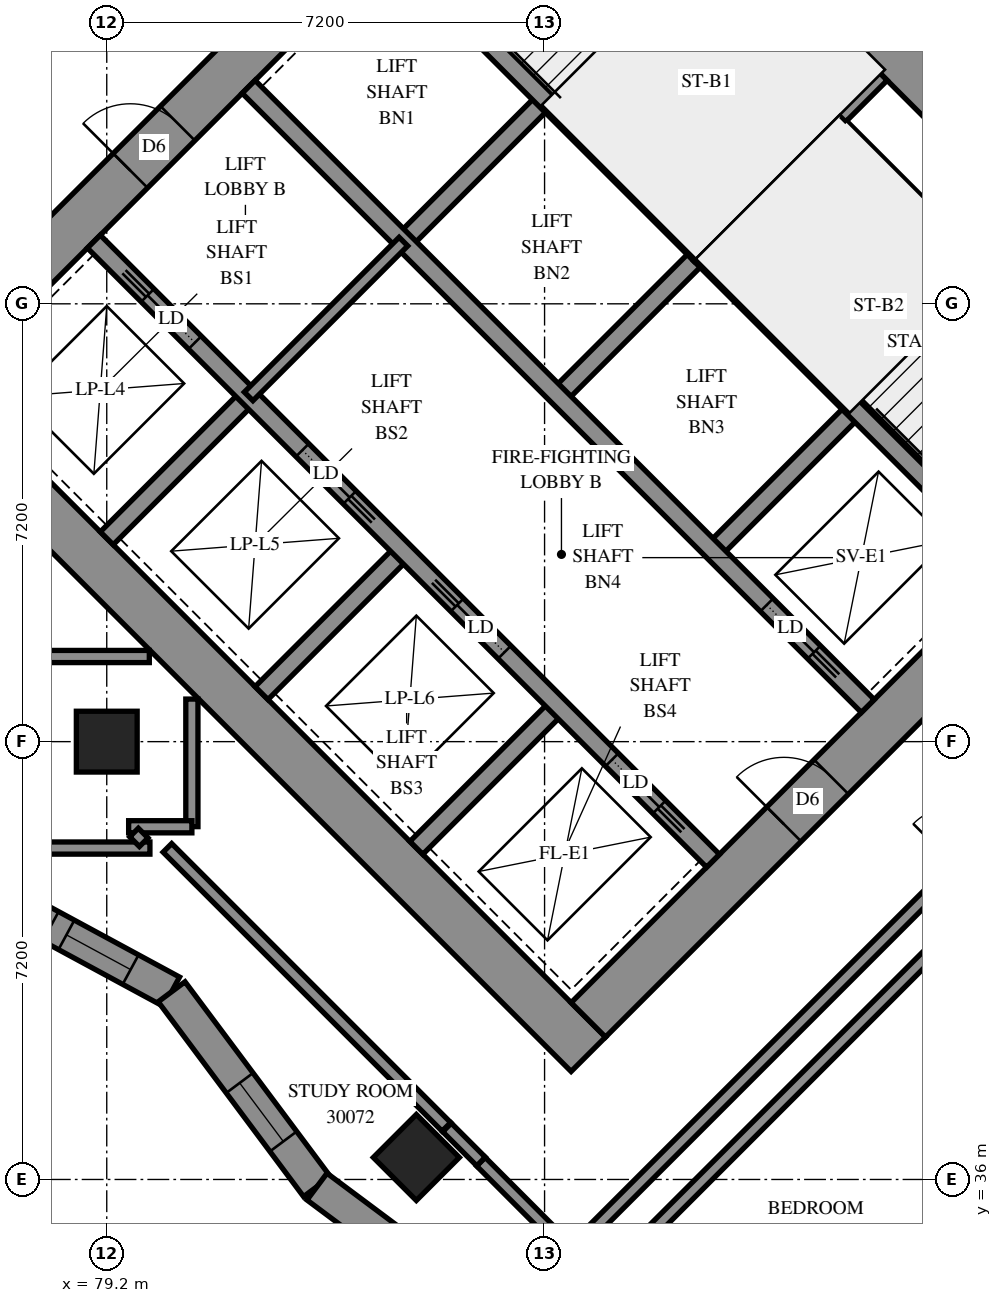
"""IFC4 building model, lengths in metres.
Left out: names, types, materials, properties, quantities, classifications, styles, units other than length and angle.
Written with IfcOpenShell. Run it as: python <this file> out.ifc"""

import sys

from ifc_helpers import new_model, si_unit, direction, frame, frame_2d, origin, origin_2d, place, context, subcontext, project, spatial, polyline, rectangle, outline, extrude, element, fill, save


model = new_model("IFC4")
c1 = context("Model", 3, precision=1e-05, world=origin(), true_north=direction((0.0, 1.0)))
c2 = subcontext(c1, "Body", "Model", "MODEL_VIEW")
j1 = project(units=[si_unit("LENGTHUNIT", "METRE"), si_unit("PLANEANGLEUNIT", "RADIAN")], contexts=[c1])
p1 = place(None, origin())
s1 = spatial("IfcSite", under=j1, at=p1, CompositionType="ELEMENT")
p2 = place(p1, origin())
s2 = spatial("IfcBuilding", under=s1, at=p2, CompositionType="ELEMENT")
p3 = place(p2, frame((0.0, 0.0, 111.8)))
s3 = spatial("IfcBuildingStorey", under=s2, at=p3, CompositionType="ELEMENT", Elevation=111.8)
for number, where, z_axis, x_axis in (
    (1, (79.2, 43.2, 0.0), (0.0, 0.0, 1.0), (1.0, 0.0, 0.0)),
    (2, (84.291, 36.362, 0.0), (0.0, 0.0, 1.0), (0.707, -0.707, 0.0)),
):
    element("IfcColumn", number, at=place(p3, frame(where, z_axis=z_axis, x_axis=x_axis)), inside=s3, PredefinedType="COLUMN", context=c2, shape_type="SweptSolid", body=[
        extrude(rectangle(XDim=1.0, YDim=1.0, at=origin_2d()), origin(), (0.0, 0.0, 1.0), 3.1),
    ])
p4 = place(p3, frame((75.806, 49.373, -0.3), z_axis=(0.0, 0.0, 1.0), x_axis=(0.7071067812, -0.7071067812, 0.0)))
e3 = element("IfcWall", 3, at=p4, inside=s3, PredefinedType="SHEAR", context=c2, shape_type="SweptSolid", body=[
    extrude(rectangle(XDim=16.0, YDim=0.8, at=frame_2d((8.0, 0.0))), origin(), (0.0, 0.0, 1.0), 2.7),
])
p5 = place(p3, frame((86.554, 60.121, -0.3), z_axis=(0.0, 0.0, 1.0), x_axis=(0.7071067812, -0.7071067812, 0.0)))
e4 = element("IfcWall", 4, at=p5, inside=s3, PredefinedType="SHEAR", context=c2, shape_type="SweptSolid", body=[
    extrude(rectangle(XDim=16.0, YDim=0.8, at=frame_2d((8.0, 0.0))), origin(), (0.0, 0.0, 1.0), 2.7),
])
p6 = place(p5, frame((10.8, 0.0, 0.3)))
e5 = element("IfcOpeningElement", 5, at=p6, cuts=e4, PredefinedType="OPENING", context=c2, shape_type="SweptSolid", body=[
    extrude(rectangle(XDim=0.8, YDim=2.1, at=frame_2d((0.4, 1.05))), frame((0.0, 0.41, 0.0), z_axis=(0.0, -1.0, 0.0), x_axis=(1.0, 0.0, 0.0)), (0.0, 0.0, 1.0), 0.82),
])
p7 = place(p3, frame((76.372, 49.373, -0.3), z_axis=(0.0, 0.0, 1.0), x_axis=(0.7071067812, 0.7071067812, 0.0)))
e6 = element("IfcWall", 6, at=p7, inside=s3, PredefinedType="SHEAR", context=c2, shape_type="SweptSolid", body=[
    extrude(rectangle(XDim=14.4, YDim=0.8, at=frame_2d((7.2, 0.0))), origin(), (0.0, 0.0, 1.0), 2.7),
])
p8 = place(p7, frame((4.55, 0.0, 0.3)))
e7 = element("IfcOpeningElement", 7, at=p8, cuts=e6, PredefinedType="OPENING", context=c2, shape_type="SweptSolid", body=[
    extrude(rectangle(XDim=1.1, YDim=2.1, at=frame_2d((0.55, 1.05))), frame((0.0, 0.41, 0.0), z_axis=(0.0, -1.0, 0.0), x_axis=(1.0, 0.0, 0.0)), (0.0, 0.0, 1.0), 0.82),
])
p9 = place(p7, frame((11.35, 0.0, 0.3)))
e8 = element("IfcOpeningElement", 8, at=p9, cuts=e6, PredefinedType="OPENING", context=c2, shape_type="SweptSolid", body=[
    extrude(rectangle(XDim=1.1, YDim=2.1, at=frame_2d((0.55, 1.05))), frame((0.0, 0.41, 0.0), z_axis=(0.0, -1.0, 0.0), x_axis=(1.0, 0.0, 0.0)), (0.0, 0.0, 1.0), 0.82),
])
p10 = place(p3, frame((87.12, 38.625, -0.3), z_axis=(0.0, 0.0, 1.0), x_axis=(0.7071067812, 0.7071067812, 0.0)))
e9 = element("IfcWall", 9, at=p10, inside=s3, PredefinedType="SHEAR", context=c2, shape_type="SweptSolid", body=[
    extrude(rectangle(XDim=14.4, YDim=0.8, at=frame_2d((7.2, 0.0))), origin(), (0.0, 0.0, 1.0), 2.7),
])
p11 = place(p10, frame((4.55, 0.0, 0.3)))
e10 = element("IfcOpeningElement", 10, at=p11, cuts=e9, PredefinedType="OPENING", context=c2, shape_type="SweptSolid", body=[
    extrude(rectangle(XDim=1.1, YDim=2.1, at=frame_2d((0.55, 1.05))), frame((0.0, 0.41, 0.0), z_axis=(0.0, -1.0, 0.0), x_axis=(1.0, 0.0, 0.0)), (0.0, 0.0, 1.0), 0.82),
])
p12 = place(p10, frame((11.35, 0.0, 0.3)))
e11 = element("IfcOpeningElement", 11, at=p12, cuts=e9, PredefinedType="OPENING", context=c2, shape_type="SweptSolid", body=[
    extrude(rectangle(XDim=1.1, YDim=2.1, at=frame_2d((0.55, 1.05))), frame((0.0, 0.41, 0.0), z_axis=(0.0, -1.0, 0.0), x_axis=(1.0, 0.0, 0.0)), (0.0, 0.0, 1.0), 0.82),
])
for number, where, z_axis, x_axis in (
    (12, (79.2, 46.544, 0.0), (0.0, 0.0, 1.0), (0.707, 0.707, 0.0)),
    (13, (84.079, 51.423, 0.0), (0.0, 0.0, 1.0), (0.707, 0.707, 0.0)),
):
    element("IfcWall", number, at=place(p3, frame(where, z_axis=z_axis, x_axis=x_axis)), inside=s3, PredefinedType="SOLIDWALL", context=c2, shape_type="SweptSolid", body=[
        extrude(rectangle(XDim=3.3, YDim=0.3, at=frame_2d((1.65, 0.0))), origin(), (0.0, 0.0, 1.0), 3.1),
    ])
p13 = place(p3, frame((81.746, 43.999, 0.0), z_axis=(0.0, 0.0, 1.0), x_axis=(0.7071067812, 0.7071067812, 0.0)))
e14 = element("IfcWall", 14, at=p13, inside=s3, PredefinedType="SOLIDWALL", context=c2, shape_type="SweptSolid", body=[
    extrude(rectangle(XDim=3.3, YDim=0.3, at=frame_2d((1.65, 0.0))), origin(), (0.0, 0.0, 1.0), 3.1),
])
p14 = place(p3, frame((86.625, 48.878, 0.0), z_axis=(0.0, 0.0, 1.0), x_axis=(0.7071067812, 0.7071067812, 0.0)))
e15 = element("IfcWall", 15, at=p14, inside=s3, PredefinedType="SOLIDWALL", context=c2, shape_type="SweptSolid", body=[
    extrude(rectangle(XDim=3.3, YDim=0.3, at=frame_2d((1.65, 0.0))), origin(), (0.0, 0.0, 1.0), 3.1),
])
p15 = place(p3, frame((84.291, 41.453, 0.0), z_axis=(0.0, 0.0, 1.0), x_axis=(0.7071067812, 0.7071067812, 0.0)))
e16 = element("IfcWall", 16, at=p15, inside=s3, PredefinedType="SOLIDWALL", context=c2, shape_type="SweptSolid", body=[
    extrude(rectangle(XDim=3.3, YDim=0.3, at=frame_2d((1.65, 0.0))), origin(), (0.0, 0.0, 1.0), 3.1),
])
p16 = place(p3, frame((89.17, 46.332, 0.0), z_axis=(0.0, 0.0, 1.0), x_axis=(0.7071067812, 0.7071067812, 0.0)))
e17 = element("IfcWall", 17, at=p16, inside=s3, PredefinedType="SOLIDWALL", context=c2, shape_type="SweptSolid", body=[
    extrude(rectangle(XDim=3.3, YDim=0.3, at=frame_2d((1.65, 0.0))), origin(), (0.0, 0.0, 1.0), 3.1),
])
p17 = place(p3, frame((78.988, 51.423, 0.0), z_axis=(0.0, 0.0, 1.0), x_axis=(0.7071067812, -0.7071067812, 0.0)))
e18 = element("IfcWall", 18, at=p17, inside=s3, PredefinedType="SOLIDWALL", context=c2, shape_type="SweptSolid", body=[
    extrude(rectangle(XDim=14.4, YDim=0.3, at=frame_2d((7.2, 0.0))), origin(), (0.0, 0.0, 1.0), 3.1),
])
p18 = place(p17, frame((1.25, 0.0, 0.0)))
e19 = element("IfcOpeningElement", 19, at=p18, cuts=e18, PredefinedType="OPENING", context=c2, shape_type="SweptSolid", body=[
    extrude(rectangle(XDim=1.1, YDim=2.1, at=frame_2d((0.55, 1.05))), frame((0.0, 0.16, 0.0), z_axis=(0.0, -1.0, 0.0), x_axis=(1.0, 0.0, 0.0)), (0.0, 0.0, 1.0), 0.32),
])
p19 = place(p17, frame((4.85, 0.0, 0.0)))
e20 = element("IfcOpeningElement", 20, at=p19, cuts=e18, PredefinedType="OPENING", context=c2, shape_type="SweptSolid", body=[
    extrude(rectangle(XDim=1.1, YDim=2.1, at=frame_2d((0.55, 1.05))), frame((0.0, 0.16, 0.0), z_axis=(0.0, -1.0, 0.0), x_axis=(1.0, 0.0, 0.0)), (0.0, 0.0, 1.0), 0.32),
])
p20 = place(p17, frame((8.45, 0.0, 0.0)))
e21 = element("IfcOpeningElement", 21, at=p20, cuts=e18, PredefinedType="OPENING", context=c2, shape_type="SweptSolid", body=[
    extrude(rectangle(XDim=1.1, YDim=2.1, at=frame_2d((0.55, 1.05))), frame((0.0, 0.16, 0.0), z_axis=(0.0, -1.0, 0.0), x_axis=(1.0, 0.0, 0.0)), (0.0, 0.0, 1.0), 0.32),
])
p21 = place(p17, frame((12.05, 0.0, 0.0)))
e22 = element("IfcOpeningElement", 22, at=p21, cuts=e18, PredefinedType="OPENING", context=c2, shape_type="SweptSolid", body=[
    extrude(rectangle(XDim=1.1, YDim=2.1, at=frame_2d((0.55, 1.05))), frame((0.0, 0.16, 0.0), z_axis=(0.0, -1.0, 0.0), x_axis=(1.0, 0.0, 0.0)), (0.0, 0.0, 1.0), 0.32),
])
p22 = place(p3, frame((81.534, 53.969, 0.0), z_axis=(0.0, 0.0, 1.0), x_axis=(0.707103309, -0.7071102534, 0.0)))
e23 = element("IfcWall", 23, at=p22, inside=s3, PredefinedType="SOLIDWALL", context=c2, shape_type="SweptSolid", body=[
    extrude(rectangle(XDim=14.4, YDim=0.3, at=frame_2d((7.2, 0.0))), origin(), (0.0, 0.0, 1.0), 3.1),
])
p23 = place(p22, frame((12.05, 0.0, 0.0)))
e24 = element("IfcOpeningElement", 24, at=p23, cuts=e23, PredefinedType="OPENING", context=c2, shape_type="SweptSolid", body=[
    extrude(rectangle(XDim=1.1, YDim=2.1, at=frame_2d((0.55, 1.05))), frame((0.0, 0.16, 0.0), z_axis=(0.0, -1.0, 0.0), x_axis=(1.0, 0.0, 0.0)), (0.0, 0.0, 1.0), 0.32),
])
for number, where, z_axis, x_axis in (
    (25, (83.867, 56.302, 0.0), (0.0, 0.0, 1.0), (0.707, -0.707, 0.0)),
    (26, (88.958, 51.211, 0.0), (0.0, 0.0, 1.0), (0.707, -0.707, 0.0)),
):
    element("IfcWall", number, at=place(p3, frame(where, z_axis=z_axis, x_axis=x_axis)), inside=s3, PredefinedType="SOLIDWALL", context=c2, shape_type="SweptSolid", body=[
        extrude(rectangle(XDim=7.2, YDim=0.3, at=frame_2d((3.6, 0.0))), origin(), (0.0, 0.0, 1.0), 3.1),
    ])
p24 = place(p3, frame((88.958, 51.211, 0.0), z_axis=(0.0, 0.0, 1.0), x_axis=(0.7071067812, 0.7071067812, 0.0)))
e27 = element("IfcWall", 27, at=p24, inside=s3, PredefinedType="SOLIDWALL", context=c2, shape_type="SweptSolid", body=[
    extrude(rectangle(XDim=4.2, YDim=0.3, at=frame_2d((2.1, 0.0))), origin(), (0.0, 0.0, 1.0), 3.1),
])
p25 = place(p3, frame((76.581, 41.081, 0.0), z_axis=(0.0, 0.0, 1.0), x_axis=(0.8794967773, -0.475904842, 0.0)))
e28 = element("IfcWall", 28, at=p25, inside=s3, PredefinedType="SOLIDWALL", context=c2, shape_type="SweptSolid", body=[
    extrude(outline(polyline([(0.023, -0.275), (4.13, -0.275), (4.251, 0.275), (-0.023, 0.275), (0.023, -0.275)])), origin(), (0.0, 0.0, 1.0), 3.1),
])
p26 = place(p25, frame((0.729, 0.0, 0.5)))
e29 = element("IfcOpeningElement", 29, at=p26, cuts=e28, PredefinedType="OPENING", context=c2, shape_type="SweptSolid", body=[
    extrude(rectangle(XDim=1.2, YDim=2.45, at=frame_2d((0.6, 1.225))), frame((0.0, 0.285, 0.0), z_axis=(0.0, -1.0, 0.0), x_axis=(1.0, 0.0, 0.0)), (0.0, 0.0, 1.0), 0.57),
])
p27 = place(p25, frame((2.224, 0.0, 0.5)))
e30 = element("IfcOpeningElement", 30, at=p27, cuts=e28, PredefinedType="OPENING", context=c2, shape_type="SweptSolid", body=[
    extrude(rectangle(XDim=1.2, YDim=2.45, at=frame_2d((0.6, 1.225))), frame((0.0, 0.285, 0.0), z_axis=(0.0, -1.0, 0.0), x_axis=(1.0, 0.0, 0.0)), (0.0, 0.0, 1.0), 0.57),
])
p28 = place(p3, frame((80.266, 39.087, 0.0), z_axis=(0.0, 0.0, 1.0), x_axis=(0.5980693066, -0.8014443864, 0.0)))
e31 = element("IfcWall", 31, at=p28, inside=s3, PredefinedType="SOLIDWALL", context=c2, shape_type="SweptSolid", body=[
    extrude(outline(polyline([(0.061, -0.275), (4.038, -0.275), (3.958, 0.275), (-0.061, 0.275), (0.061, -0.275)])), origin(), (0.0, 0.0, 1.0), 3.1),
])
p29 = place(p28, frame((1.871, 0.0, 0.5)))
e32 = element("IfcOpeningElement", 32, at=p29, cuts=e31, PredefinedType="OPENING", context=c2, shape_type="SweptSolid", body=[
    extrude(rectangle(XDim=1.2, YDim=2.45, at=frame_2d((0.6, 1.225))), frame((0.0, 0.285, 0.0), z_axis=(0.0, -1.0, 0.0), x_axis=(1.0, 0.0, 0.0)), (0.0, 0.0, 1.0), 0.57),
])
p30 = place(p3, frame((82.658, 35.882, 0.0), z_axis=(0.0, 0.0, 1.0), x_axis=(0.8014458841, -0.5980672997, 0.0)))
e33 = element("IfcWall", 33, at=p30, inside=s3, PredefinedType="SOLIDWALL", context=c2, shape_type="SweptSolid", body=[
    extrude(outline(polyline([(-0.04, -0.275), (3.937, -0.275), (4.017, 0.275), (0.04, 0.275), (-0.04, -0.275)])), origin(), (0.0, 0.0, 1.0), 3.1),
])
p31 = place(p30, frame((1.701, 0.0, 0.5)))
e34 = element("IfcOpeningElement", 34, at=p31, cuts=e33, PredefinedType="OPENING", context=c2, shape_type="SweptSolid", body=[
    extrude(rectangle(XDim=1.2, YDim=2.45, at=frame_2d((0.6, 1.225))), frame((0.0, 0.285, 0.0), z_axis=(0.0, -1.0, 0.0), x_axis=(1.0, 0.0, 0.0)), (0.0, 0.0, 1.0), 0.57),
])
p32 = place(p3, frame((91.313, 53.354, 0.0), z_axis=(0.0, 0.0, 1.0), x_axis=(0.7071067812, -0.7071067812, 0.0)))
e35 = element("IfcWall", 35, at=p32, inside=s3, PredefinedType="PARTITIONING", context=c2, shape_type="SweptSolid", body=[
    extrude(rectangle(XDim=5.65, YDim=0.15, at=frame_2d((2.825, 0.0))), origin(), (0.0, 0.0, 1.0), 3.1),
])
p33 = place(p3, frame((81.534, 48.878, 0.0), z_axis=(0.0, 0.0, 1.0), x_axis=(0.707092892, 0.7071206701, 0.0)))
e36 = element("IfcWall", 36, at=p33, inside=s3, PredefinedType="PARTITIONING", context=c2, shape_type="SweptSolid", body=[
    extrude(rectangle(XDim=3.6, YDim=0.2, at=frame_2d((1.8, 0.0))), origin(), (0.0, 0.0, 1.0), 3.1),
])
p34 = place(p3, frame((86.331, 33.312, 0.0), z_axis=(0.0, 0.0, 1.0), x_axis=(0.707102476, 0.7071110864, 0.0)))
e37 = element("IfcWall", 37, at=p34, inside=s3, PredefinedType="PARTITIONING", context=c2, shape_type="SweptSolid", body=[
    extrude(rectangle(XDim=11.614, YDim=0.2, at=frame_2d((5.807, 0.0))), origin(), (0.0, 0.0, 1.0), 3.1),
])
p35 = place(p3, frame((91.452, 28.25, 0.0), z_axis=(0.0, 0.0, 1.0), x_axis=(0.7071931897, 0.7070203621, 0.0)))
e38 = element("IfcWall", 38, at=p35, inside=s3, PredefinedType="PARTITIONING", context=c2, shape_type="SweptSolid", body=[
    extrude(rectangle(XDim=11.572, YDim=0.2, at=frame_2d((5.786, 0.0))), origin(), (0.0, 0.0, 1.0), 3.1),
])
p36 = place(p3, frame((86.835, 34.806, 0.0), z_axis=(0.0, 0.0, 1.0), x_axis=(0.7071067812, 0.7071067812, 0.0)))
e39 = element("IfcWall", 39, at=p36, inside=s3, PredefinedType="PARTITIONING", context=c2, shape_type="SweptSolid", body=[
    extrude(rectangle(XDim=10.201, YDim=0.2, at=frame_2d((5.1, 0.0))), origin(), (0.0, 0.0, 1.0), 3.1),
])
p37 = place(p36, frame((8.959, 0.0, 0.0)))
e40 = element("IfcOpeningElement", 40, at=p37, cuts=e39, PredefinedType="OPENING", context=c2, shape_type="SweptSolid", body=[
    extrude(rectangle(XDim=1.0, YDim=2.1, at=frame_2d((0.5, 1.05))), frame((0.0, 0.11, 0.0), z_axis=(0.0, -1.0, 0.0), x_axis=(1.0, 0.0, 0.0)), (0.0, 0.0, 1.0), 0.22),
])
p38 = place(p3, frame((80.197, 41.453, 0.0), z_axis=(0.0, 0.0, 1.0), x_axis=(0.7071067812, -0.7071067812, 0.0)))
e41 = element("IfcWall", 41, at=p38, inside=s3, PredefinedType="PARTITIONING", context=c2, shape_type="SweptSolid", body=[
    extrude(rectangle(XDim=6.488, YDim=0.2, at=frame_2d((3.244, 0.0))), origin(), (0.0, 0.0, 1.0), 3.1),
])
p39 = place(p3, frame((89.881, 31.771, 0.0), z_axis=(0.0, 0.0, 1.0), x_axis=(0.7071067812, 0.7071067812, 0.0)))
e42 = element("IfcWall", 42, at=p39, inside=s3, PredefinedType="PARTITIONING", context=c2, shape_type="SweptSolid", body=[
    extrude(rectangle(XDim=5.787, YDim=0.2, at=frame_2d((2.893, 0.0))), origin(), (0.0, 0.0, 1.0), 3.1),
])
p40 = place(p3, frame((77.363, 53.901, 0.0), z_axis=(0.0, 0.0, 1.0), x_axis=(0.7071067812, 0.7071067812, 0.0)))
e43 = element("IfcWall", 43, at=p40, inside=s3, PredefinedType="PARTITIONING", context=c2, shape_type="SweptSolid", body=[
    extrude(rectangle(XDim=2.755, YDim=0.2, at=frame_2d((1.377, 0.0))), origin(), (0.0, 0.0, 1.0), 3.1),
])
p41 = place(p3, frame((77.452, 41.45, 0.0), z_axis=(0.0, 0.0, 1.0), x_axis=(1.0, 0.0, 0.0)))
e44 = element("IfcWall", 44, at=p41, inside=s3, PredefinedType="PARTITIONING", context=c2, shape_type="SweptSolid", body=[
    extrude(rectangle(XDim=2.458, YDim=0.2, at=frame_2d((1.229, 0.0))), origin(), (0.0, 0.0, 1.0), 3.1),
])
p42 = place(p3, frame((85.353, 36.293, 0.0), z_axis=(0.0, 0.0, 1.0), x_axis=(0.7066304548, -0.7075827869, 0.0)))
e45 = element("IfcWall", 45, at=p42, inside=s3, PredefinedType="PARTITIONING", context=c2, shape_type="SweptSolid", body=[
    extrude(rectangle(XDim=2.1, YDim=0.2, at=frame_2d((1.05, 0.0))), origin(), (0.0, 0.0, 1.0), 3.1),
])
for number, where, z_axis, x_axis in (
    (46, (77.802, 44.6, 0.0), (0.0, 0.0, 1.0), (1.0, 0.0, 0.0)),
    (47, (80.6, 41.802, 0.0), (0.0, 0.0, 1.0), (0.0, 1.0, 0.0)),
):
    element("IfcWall", number, at=place(p3, frame(where, z_axis=z_axis, x_axis=x_axis)), inside=s3, PredefinedType="PARTITIONING", context=c2, shape_type="SweptSolid", body=[
        extrude(rectangle(XDim=2.098, YDim=0.2, at=frame_2d((1.049, 0.0))), origin(), (0.0, 0.0, 1.0), 3.1),
    ])
p43 = place(p3, frame((79.56, 41.8, 0.0), z_axis=(0.0, 0.0, 1.0), x_axis=(1.0, 0.0, 0.0)))
e48 = element("IfcWall", 48, at=p43, inside=s3, PredefinedType="PARTITIONING", context=c2, shape_type="SweptSolid", body=[
    extrude(rectangle(XDim=1.04, YDim=0.2, at=frame_2d((0.52, 0.0))), origin(), (0.0, 0.0, 1.0), 3.1),
])
p44 = place(p3, frame((84.795, 36.855, 0.0), z_axis=(0.0, 0.0, 1.0), x_axis=(0.7071067812, -0.7071067812, 0.0)))
e49 = element("IfcWall", 49, at=p44, inside=s3, PredefinedType="PARTITIONING", context=c2, shape_type="SweptSolid", body=[
    extrude(rectangle(XDim=0.792, YDim=0.2, at=frame_2d((0.396, 0.0))), origin(), (0.0, 0.0, 1.0), 3.1),
])
p45 = place(p3, frame((79.649, 41.705, 0.0), z_axis=(0.0, 0.0, 1.0), x_axis=(0.7068844555, -0.707329037, 0.0)))
e50 = element("IfcWall", 50, at=p45, inside=s3, PredefinedType="PARTITIONING", context=c2, shape_type="SweptSolid", body=[
    extrude(rectangle(XDim=0.225, YDim=0.2, at=frame_2d((0.112, 0.0))), origin(), (0.0, 0.0, 1.0), 3.1),
])
p46 = place(p26, origin())
e51 = element("IfcWindow", 51, at=p46, inside=s3, PartitioningType="SINGLE_PANEL", PredefinedType="WINDOW", context=c2, shape_type="SweptSolid", body=[
    extrude(rectangle(XDim=1.2, YDim=2.45, at=frame_2d((0.6, 1.225))), frame((0.0, 0.155, 0.0), z_axis=(0.0, -1.0, 0.0), x_axis=(1.0, 0.0, 0.0)), (0.0, 0.0, 1.0), 0.06),
])
fill(e29, e51)
p47 = place(p27, origin())
e52 = element("IfcWindow", 52, at=p47, inside=s3, PartitioningType="SINGLE_PANEL", PredefinedType="WINDOW", context=c2, shape_type="SweptSolid", body=[
    extrude(rectangle(XDim=1.2, YDim=2.45, at=frame_2d((0.6, 1.225))), frame((0.0, 0.155, 0.0), z_axis=(0.0, -1.0, 0.0), x_axis=(1.0, 0.0, 0.0)), (0.0, 0.0, 1.0), 0.06),
])
fill(e30, e52)
p48 = place(p29, origin())
e53 = element("IfcWindow", 53, at=p48, inside=s3, PartitioningType="SINGLE_PANEL", PredefinedType="WINDOW", context=c2, shape_type="SweptSolid", body=[
    extrude(rectangle(XDim=1.2, YDim=2.45, at=frame_2d((0.6, 1.225))), frame((0.0, 0.155, 0.0), z_axis=(0.0, -1.0, 0.0), x_axis=(1.0, 0.0, 0.0)), (0.0, 0.0, 1.0), 0.06),
])
fill(e32, e53)
p49 = place(p8, origin())
e54 = element("IfcDoor", 54, at=p49, inside=s3, OperationType="DOUBLE_DOOR_SINGLE_SWING", PredefinedType="DOOR", context=c2, shape_type="SweptSolid", body=[
    extrude(rectangle(XDim=1.1, YDim=2.1, at=frame_2d((0.55, 1.05))), frame((0.0, 0.025, 0.0), z_axis=(0.0, -1.0, 0.0), x_axis=(1.0, 0.0, 0.0)), (0.0, 0.0, 1.0), 0.05),
])
fill(e7, e54)
p50 = place(p11, origin())
e55 = element("IfcDoor", 55, at=p50, inside=s3, OperationType="DOUBLE_DOOR_SINGLE_SWING", PredefinedType="DOOR", context=c2, shape_type="SweptSolid", body=[
    extrude(rectangle(XDim=1.1, YDim=2.1, at=frame_2d((0.55, 1.05))), frame((0.0, 0.025, 0.0), z_axis=(0.0, -1.0, 0.0), x_axis=(1.0, 0.0, 0.0)), (0.0, 0.0, 1.0), 0.05),
])
fill(e10, e55)
p51 = place(p18, origin())
e56 = element("IfcDoor", 56, at=p51, inside=s3, OperationType="SLIDING_TO_LEFT", PredefinedType="DOOR", context=c2, shape_type="SweptSolid", body=[
    extrude(rectangle(XDim=1.1, YDim=2.1, at=frame_2d((0.55, 1.05))), frame((0.0, 0.025, 0.0), z_axis=(0.0, -1.0, 0.0), x_axis=(1.0, 0.0, 0.0)), (0.0, 0.0, 1.0), 0.05),
])
fill(e19, e56)
p52 = place(p19, origin())
e57 = element("IfcDoor", 57, at=p52, inside=s3, OperationType="SLIDING_TO_RIGHT", PredefinedType="DOOR", context=c2, shape_type="SweptSolid", body=[
    extrude(rectangle(XDim=1.1, YDim=2.1, at=frame_2d((0.55, 1.05))), frame((0.0, 0.025, 0.0), z_axis=(0.0, -1.0, 0.0), x_axis=(1.0, 0.0, 0.0)), (0.0, 0.0, 1.0), 0.05),
])
fill(e20, e57)
p53 = place(p20, origin())
e58 = element("IfcDoor", 58, at=p53, inside=s3, OperationType="SLIDING_TO_LEFT", PredefinedType="DOOR", context=c2, shape_type="SweptSolid", body=[
    extrude(rectangle(XDim=1.1, YDim=2.1, at=frame_2d((0.55, 1.05))), frame((0.0, 0.025, 0.0), z_axis=(0.0, -1.0, 0.0), x_axis=(1.0, 0.0, 0.0)), (0.0, 0.0, 1.0), 0.05),
])
fill(e21, e58)
p54 = place(p21, origin())
e59 = element("IfcDoor", 59, at=p54, inside=s3, OperationType="SLIDING_TO_RIGHT", PredefinedType="DOOR", context=c2, shape_type="SweptSolid", body=[
    extrude(rectangle(XDim=1.1, YDim=2.1, at=frame_2d((0.55, 1.05))), frame((0.0, 0.025, 0.0), z_axis=(0.0, -1.0, 0.0), x_axis=(1.0, 0.0, 0.0)), (0.0, 0.0, 1.0), 0.05),
])
fill(e22, e59)
p55 = place(p23, origin())
e60 = element("IfcDoor", 60, at=p55, inside=s3, OperationType="SLIDING_TO_RIGHT", PredefinedType="DOOR", context=c2, shape_type="SweptSolid", body=[
    extrude(rectangle(XDim=1.1, YDim=2.1, at=frame_2d((0.55, 1.05))), frame((0.0, 0.025, 0.0), z_axis=(0.0, -1.0, 0.0), x_axis=(1.0, 0.0, 0.0)), (0.0, 0.0, 1.0), 0.05),
])
fill(e24, e60)
save(model, sys.argv[1])
